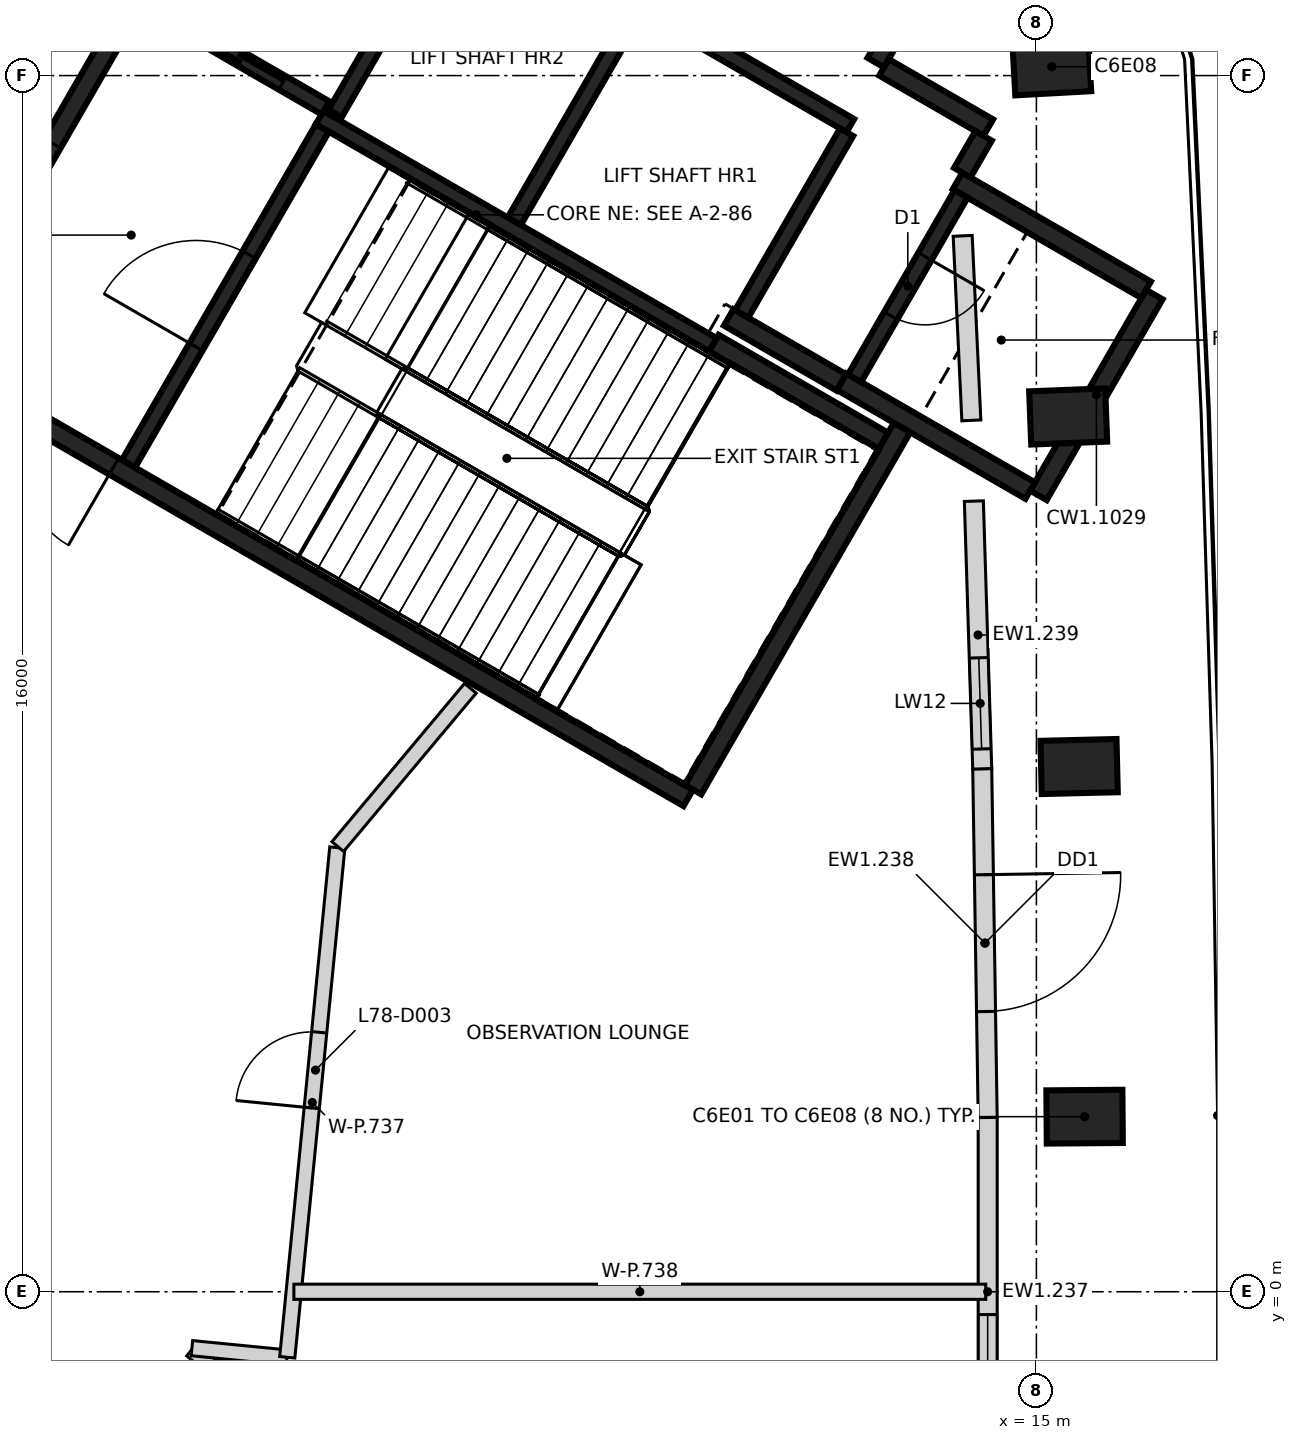
"""IFC4 building model, lengths in metres.
Left out: names, types, materials, properties, quantities, classifications, styles, units other than length and angle.
Written with IfcOpenShell. Run it as: python <this file> out.ifc"""

import sys

from ifc_helpers import new_model, si_unit, direction, frame, frame_2d, origin, origin_2d, place, context, subcontext, project, spatial, rectangle, extrude, element, fill, save


model = new_model("IFC4")
c1 = context("Model", 3, precision=1e-05, world=origin(), true_north=direction((0.0, 1.0)))
c2 = subcontext(c1, "Body", "Model", "MODEL_VIEW")
j1 = project(units=[si_unit("LENGTHUNIT", "METRE"), si_unit("PLANEANGLEUNIT", "RADIAN")], contexts=[c1])
p1 = place(None, origin())
s1 = spatial("IfcSite", under=j1, at=p1, CompositionType="ELEMENT")
p2 = place(p1, origin())
s2 = spatial("IfcBuilding", under=s1, at=p2, CompositionType="ELEMENT")
p3 = place(p2, frame((0.0, 0.0, 312.6)))
s3 = spatial("IfcBuildingStorey", under=s2, at=p3, CompositionType="ELEMENT", Elevation=312.6)
for number, where, z_axis, x_axis in (
    (1, (15.634, 2.303, -0.35), (0.0, 0.0, 1.0), (1.0, 0.008, 0.0)),
    (2, (15.562, 6.91, -0.35), (0.0, 0.0, 1.0), (1.0, 0.024, 0.0)),
    (3, (15.418, 11.515, -0.35), (0.0, 0.0, 1.0), (0.999, 0.039, 0.0)),
    (4, (15.202, 16.117, -0.35), (0.0, 0.0, 1.0), (0.998, 0.055, 0.0)),
):
    element("IfcColumn", number, at=place(p3, frame(where, z_axis=z_axis, x_axis=x_axis)), inside=s3, PredefinedType="COLUMN", context=c2, shape_type="SweptSolid", body=[
        extrude(rectangle(XDim=1.0, YDim=0.7, at=origin_2d()), origin(), (0.0, 0.0, 1.0), 8.1),
    ])
p4 = place(p3, frame((14.359, 2.295, 0.0), z_axis=(0.0, 0.0, 1.0), x_axis=(0.0, -1.0, 0.0)))
e5 = element("IfcWall", 5, at=p4, inside=s3, PredefinedType="SOLIDWALL", context=c2, shape_type="SweptSolid", body=[
    extrude(rectangle(XDim=4.589, YDim=0.25, at=frame_2d((2.295, 0.0))), origin(), (0.0, 0.0, 1.0), 7.75),
])
p5 = place(p4, frame((2.595, 0.0, 0.9)))
e6 = element("IfcOpeningElement", 6, at=p5, cuts=e5, PredefinedType="OPENING", context=c2, shape_type="SweptSolid", body=[
    extrude(rectangle(XDim=1.8, YDim=2.4, at=frame_2d((0.9, 1.2))), frame((0.0, 0.135, 0.0), z_axis=(0.0, -1.0, 0.0), x_axis=(1.0, 0.0, 0.0)), (0.0, 0.0, 1.0), 0.27),
])
p6 = place(p3, frame((14.287, 6.882, 0.0), z_axis=(0.0, 0.0, 1.0), x_axis=(0.015639712785, -0.999877692212, 0.0)))
e7 = element("IfcWall", 7, at=p6, inside=s3, PredefinedType="SOLIDWALL", context=c2, shape_type="SweptSolid", body=[
    extrude(rectangle(XDim=4.589, YDim=0.25, at=frame_2d((2.295, 0.0))), origin(), (0.0, 0.0, 1.0), 7.75),
])
p7 = place(p6, frame((1.395, 0.0, 0.0)))
e8 = element("IfcOpeningElement", 8, at=p7, cuts=e7, PredefinedType="OPENING", context=c2, shape_type="SweptSolid", body=[
    extrude(rectangle(XDim=1.8, YDim=2.4, at=frame_2d((0.9, 1.2))), frame((0.0, 0.135, 0.0), z_axis=(0.0, -1.0, 0.0), x_axis=(1.0, 0.0, 0.0)), (0.0, 0.0, 1.0), 0.27),
])
p8 = place(p3, frame((14.177, 10.401, 0.0), z_axis=(0.0, 0.0, 1.0), x_axis=(0.031249894825, -0.999511602771, 0.0)))
e9 = element("IfcWall", 9, at=p8, inside=s3, PredefinedType="SOLIDWALL", context=c2, shape_type="SweptSolid", body=[
    extrude(rectangle(XDim=3.523, YDim=0.25, at=frame_2d((1.762, 0.0))), origin(), (0.0, 0.0, 1.0), 7.75),
])
p9 = place(p8, frame((2.062, 0.0, 0.9)))
e10 = element("IfcOpeningElement", 10, at=p9, cuts=e9, PredefinedType="OPENING", context=c2, shape_type="SweptSolid", body=[
    extrude(rectangle(XDim=1.2, YDim=2.4, at=frame_2d((0.6, 1.2))), frame((0.0, 0.135, 0.0), z_axis=(0.0, -1.0, 0.0), x_axis=(1.0, 0.0, 0.0)), (0.0, 0.0, 1.0), 0.27),
])
p10 = place(p3, frame((14.03, 13.891, 0.0), z_axis=(0.0, 0.0, 1.0), x_axis=(0.046815754834, -0.998903541439, 0.0)))
e11 = element("IfcWall", 11, at=p10, inside=s3, PredefinedType="SOLIDWALL", context=c2, shape_type="SweptSolid", body=[
    extrude(rectangle(XDim=2.43, YDim=0.25, at=frame_2d((1.215, 0.0))), origin(), (0.0, 0.0, 1.0), 7.75),
])
p11 = place(p3, frame((10.42, 6.498, 0.0), z_axis=(0.0, 0.0, 1.0), x_axis=(-0.866021906294, 0.500006057782, 0.0)))
e12 = element("IfcWall", 12, at=p11, inside=s3, PredefinedType="SHEAR", context=c2, shape_type="SweptSolid", body=[
    extrude(rectangle(XDim=11.55, YDim=0.25, at=frame_2d((5.775, 0.0))), origin(), (0.0, 0.0, 1.0), 7.75),
])
p12 = place(p11, frame((10.025, 0.0, 0.0)))
e13 = element("IfcOpeningElement", 13, at=p12, cuts=e12, PredefinedType="OPENING", context=c2, shape_type="SweptSolid", body=[
    extrude(rectangle(XDim=1.2, YDim=2.1, at=frame_2d((0.6, 1.05))), frame((0.0, 0.135, 0.0), z_axis=(0.0, -1.0, 0.0), x_axis=(1.0, 0.0, 0.0)), (0.0, 0.0, 1.0), 0.27),
])
p13 = place(p11, frame((8.725, 0.0, 0.0)))
e14 = element("IfcOpeningElement", 14, at=p13, cuts=e12, PredefinedType="OPENING", context=c2, shape_type="SweptSolid", body=[
    extrude(rectangle(XDim=1.2, YDim=2.1, at=frame_2d((0.6, 1.05))), frame((0.0, 0.135, 0.0), z_axis=(0.0, -1.0, 0.0), x_axis=(1.0, 0.0, 0.0)), (0.0, 0.0, 1.0), 0.27),
])
p14 = place(p3, frame((0.48, 12.381, 0.0), z_axis=(0.0, 0.0, 1.0), x_axis=(0.49999885962, 0.866026062182, 0.0)))
e15 = element("IfcWall", 15, at=p14, inside=s3, PredefinedType="SHEAR", context=c2, shape_type="SweptSolid", body=[
    extrude(rectangle(XDim=5.225, YDim=0.25, at=frame_2d((2.612, 0.0))), origin(), (0.0, 0.0, 1.0), 7.75),
])
p15 = place(p14, frame((1.949, 0.0, 0.0)))
e16 = element("IfcOpeningElement", 16, at=p15, cuts=e15, PredefinedType="OPENING", context=c2, shape_type="SweptSolid", body=[
    extrude(rectangle(XDim=1.2, YDim=2.1, at=frame_2d((0.6, 1.05))), frame((0.0, 0.135, 0.0), z_axis=(0.0, -1.0, 0.0), x_axis=(1.0, 0.0, 0.0)), (0.0, 0.0, 1.0), 0.27),
])
p16 = place(p3, frame((13.238, 11.378, 0.0), z_axis=(0.0, 0.0, 1.0), x_axis=(-0.500008851346, -0.866020293397, 0.0)))
e17 = element("IfcWall", 17, at=p16, inside=s3, PredefinedType="SHEAR", context=c2, shape_type="SweptSolid", body=[
    extrude(rectangle(XDim=5.51, YDim=0.25, at=frame_2d((2.755, 0.0))), origin(), (0.0, 0.0, 1.0), 7.75),
])
p17 = place(p3, frame((16.552, 13.119, 0.0), z_axis=(0.0, 0.0, 1.0), x_axis=(-0.499978833458, -0.866037623948, 0.0)))
e18 = element("IfcWall", 18, at=p17, inside=s3, PredefinedType="SHEAR", context=c2, shape_type="SweptSolid", body=[
    extrude(rectangle(XDim=3.05, YDim=0.25, at=frame_2d((1.525, 0.0))), origin(), (0.0, 0.0, 1.0), 7.75),
])
p18 = place(p3, frame((14.918, 10.54, 0.0), z_axis=(0.0, 0.0, 1.0), x_axis=(-0.866063538972, 0.499933942099, 0.0)))
e19 = element("IfcWall", 19, at=p18, inside=s3, PredefinedType="SHEAR", context=c2, shape_type="SweptSolid", body=[
    extrude(rectangle(XDim=2.865, YDim=0.25, at=frame_2d((1.432, 0.0))), origin(), (0.0, 0.0, 1.0), 7.75),
])
p19 = place(p3, frame((13.963, 14.614, 0.0), z_axis=(0.0, 0.0, 1.0), x_axis=(0.866042235819, -0.499970844928, 0.0)))
e20 = element("IfcWall", 20, at=p19, inside=s3, PredefinedType="SHEAR", context=c2, shape_type="SweptSolid", body=[
    extrude(rectangle(XDim=2.865, YDim=0.25, at=frame_2d((1.432, 0.0))), origin(), (0.0, 0.0, 1.0), 7.75),
])
p20 = place(p3, frame((10.757, 12.481, 0.0), z_axis=(0.0, 0.0, 1.0), x_axis=(0.866022940537, -0.500004266446, 0.0)))
e21 = element("IfcWall", 21, at=p20, inside=s3, PredefinedType="SHEAR", context=c2, shape_type="SweptSolid", body=[
    extrude(rectangle(XDim=2.575, YDim=0.25, at=frame_2d((1.287, 0.0))), origin(), (0.0, 0.0, 1.0), 7.75),
])
p21 = place(p3, frame((13.819, 17.785, 0.0), z_axis=(0.0, 0.0, 1.0), x_axis=(-0.500039802285, -0.866002422705, 0.0)))
e22 = element("IfcWall", 22, at=p21, inside=s3, PredefinedType="SHEAR", context=c2, shape_type="SweptSolid", body=[
    extrude(rectangle(XDim=1.865, YDim=0.25, at=frame_2d((0.932, 0.0))), origin(), (0.0, 0.0, 1.0), 7.75),
])
p22 = place(p3, frame((12.433, 11.964, 0.0), z_axis=(0.0, 0.0, 1.0), x_axis=(-0.866038183914, 0.499977863513, 0.0)))
e23 = element("IfcWall", 23, at=p22, inside=s3, PredefinedType="SHEAR", context=c2, shape_type="SweptSolid", body=[
    extrude(rectangle(XDim=1.71, YDim=0.25, at=frame_2d((0.855, 0.0))), origin(), (0.0, 0.0, 1.0), 7.75),
])
p23 = place(p3, frame((12.995, 16.108, 0.0), z_axis=(0.0, 0.0, 1.0), x_axis=(0.866044474677, -0.49996696679, 0.0)))
e24 = element("IfcWall", 24, at=p23, inside=s3, PredefinedType="SHEAR", context=c2, shape_type="SweptSolid", body=[
    extrude(rectangle(XDim=1.584, YDim=0.25, at=frame_2d((0.792, 0.0))), origin(), (0.0, 0.0, 1.0), 7.75),
])
p24 = place(p3, frame((14.305, 15.207, 0.0), z_axis=(0.0, 0.0, 1.0), x_axis=(-0.499848422343, -0.866112899501, 0.0)))
e25 = element("IfcWall", 25, at=p24, inside=s3, PredefinedType="SHEAR", context=c2, shape_type="SweptSolid", body=[
    extrude(rectangle(XDim=0.559, YDim=0.25, at=frame_2d((0.28, 0.0))), origin(), (0.0, 0.0, 1.0), 7.75),
])
p25 = place(p3, frame((12.552, 15.342, 0.0), z_axis=(0.0, 0.0, 1.0), x_axis=(-0.866030299012, 0.499991521122, 0.0)))
e26 = element("IfcWall", 26, at=p25, inside=s3, PredefinedType="SHEAR", context=c2, shape_type="SweptSolid", body=[
    extrude(rectangle(XDim=6.1, YDim=0.2, at=frame_2d((3.05, 0.0))), origin(), (0.0, 0.0, 1.0), 7.75),
])
p26 = place(p3, frame((10.743, 12.46, 0.0), z_axis=(0.0, 0.0, 1.0), x_axis=(-0.866018848283, 0.500011354289, 0.0)))
e27 = element("IfcWall", 27, at=p26, inside=s3, PredefinedType="SHEAR", context=c2, shape_type="SweptSolid", body=[
    extrude(rectangle(XDim=5.974, YDim=0.2, at=frame_2d((2.987, 0.0))), origin(), (0.0, 0.0, 1.0), 7.75),
])
p27 = place(p3, frame((3.057, 10.895, 0.0), z_axis=(0.0, 0.0, 1.0), x_axis=(0.500027839223, 0.866009330205, 0.0)))
e28 = element("IfcWall", 28, at=p27, inside=s3, PredefinedType="SHEAR", context=c2, shape_type="SweptSolid", body=[
    extrude(rectangle(XDim=5.098, YDim=0.2, at=frame_2d((2.549, 0.0))), origin(), (0.0, 0.0, 1.0), 7.75),
])
p28 = place(p27, frame((1.774, 0.0, 0.0)))
e29 = element("IfcOpeningElement", 29, at=p28, cuts=e28, PredefinedType="OPENING", context=c2, shape_type="SweptSolid", body=[
    extrude(rectangle(XDim=1.4, YDim=2.1, at=frame_2d((0.7, 1.05))), frame((0.0, 0.11, 0.0), z_axis=(0.0, -1.0, 0.0), x_axis=(1.0, 0.0, 0.0)), (0.0, 0.0, 1.0), 0.22),
])
p29 = place(p3, frame((8.132, 14.084, 0.0), z_axis=(0.0, 0.0, 1.0), x_axis=(0.500030834389, 0.86600760081, 0.0)))
e30 = element("IfcWall", 30, at=p29, inside=s3, PredefinedType="SHEAR", context=c2, shape_type="SweptSolid", body=[
    extrude(rectangle(XDim=3.198, YDim=0.2, at=frame_2d((1.599, 0.0))), origin(), (0.0, 0.0, 1.0), 7.75),
])
p30 = place(p3, frame((14.008, 14.442, 0.0), z_axis=(0.0, 0.0, 1.0), x_axis=(-0.499986818241, -0.866033014143, 0.0)))
e31 = element("IfcWall", 31, at=p30, inside=s3, PredefinedType="SHEAR", context=c2, shape_type="SweptSolid", body=[
    extrude(rectangle(XDim=2.798, YDim=0.2, at=frame_2d((1.399, 0.0))), origin(), (0.0, 0.0, 1.0), 7.75),
])
p31 = place(p30, frame((0.949, 0.0, 0.0)))
e32 = element("IfcOpeningElement", 32, at=p31, cuts=e31, PredefinedType="OPENING", context=c2, shape_type="SweptSolid", body=[
    extrude(rectangle(XDim=0.9, YDim=2.1, at=frame_2d((0.45, 1.05))), frame((0.0, 0.11, 0.0), z_axis=(0.0, -1.0, 0.0), x_axis=(1.0, 0.0, 0.0)), (0.0, 0.0, 1.0), 0.22),
])
p32 = place(p3, frame((12.502, 15.255, 0.0), z_axis=(0.0, 0.0, 1.0), x_axis=(-0.499965018551, -0.866045599391, 0.0)))
e33 = element("IfcWall", 33, at=p32, inside=s3, PredefinedType="SHEAR", context=c2, shape_type="SweptSolid", body=[
    extrude(rectangle(XDim=2.759, YDim=0.2, at=frame_2d((1.379, 0.0))), origin(), (0.0, 0.0, 1.0), 7.75),
])
p33 = place(p3, frame((7.324, 18.187, 0.0), z_axis=(0.0, 0.0, 1.0), x_axis=(-0.499967891604, -0.866043940782, 0.0)))
e34 = element("IfcWall", 34, at=p33, inside=s3, PredefinedType="SHEAR", context=c2, shape_type="SweptSolid", body=[
    extrude(rectangle(XDim=3.1, YDim=0.2, at=frame_2d((1.55, 0.0))), origin(), (0.0, 0.0, 1.0), 7.75),
])
p34 = place(p3, frame((5.646, 15.576, 0.0), z_axis=(0.0, 0.0, 1.0), x_axis=(-0.866018407898, 0.500012117035, 0.0)))
e35 = element("IfcWall", 35, at=p34, inside=s3, PredefinedType="SHEAR", context=c2, shape_type="SweptSolid", body=[
    extrude(rectangle(XDim=2.651, YDim=0.2, at=frame_2d((1.325, 0.0))), origin(), (0.0, 0.0, 1.0), 7.75),
])
p35 = place(p34, frame((0.652, 0.0, 0.0)))
e36 = element("IfcOpeningElement", 36, at=p35, cuts=e35, PredefinedType="OPENING", context=c2, shape_type="SweptSolid", body=[
    extrude(rectangle(XDim=1.3, YDim=2.1, at=frame_2d((0.65, 1.05))), frame((0.0, 0.11, 0.0), z_axis=(0.0, -1.0, 0.0), x_axis=(1.0, 0.0, 0.0)), (0.0, 0.0, 1.0), 0.22),
])
p36 = place(p3, frame((-0.891, 13.057, 0.0), z_axis=(0.0, 0.0, 1.0), x_axis=(0.500039268703, 0.866002730801, 0.0)))
e37 = element("IfcWall", 37, at=p36, inside=s3, PredefinedType="PARTITIONING", context=c2, shape_type="SweptSolid", body=[
    extrude(rectangle(XDim=6.537, YDim=0.2, at=frame_2d((3.269, 0.0))), origin(), (0.0, 0.0, 1.0), 7.75),
])
p37 = place(p3, frame((3.884, -0.766, 0.0), z_axis=(0.0, 0.0, 1.0), x_axis=(0.782143113399, -0.623098828568, 0.0)))
e38 = element("IfcWall", 38, at=p37, inside=s3, PredefinedType="PARTITIONING", context=c2, shape_type="SweptSolid", body=[
    extrude(rectangle(XDim=6.496, YDim=0.2, at=frame_2d((3.248, 0.0))), origin(), (0.0, 0.0, 1.0), 7.75),
])
p38 = place(p37, frame((2.748, 0.0, 0.0)))
e39 = element("IfcOpeningElement", 39, at=p38, cuts=e38, PredefinedType="OPENING", context=c2, shape_type="SweptSolid", body=[
    extrude(rectangle(XDim=1.0, YDim=2.1, at=frame_2d((0.5, 1.05))), frame((0.0, 0.11, 0.0), z_axis=(0.0, -1.0, 0.0), x_axis=(1.0, 0.0, 0.0)), (0.0, 0.0, 1.0), 0.22),
])
p39 = place(p3, frame((3.89, -0.742, 0.0), z_axis=(0.0, 0.0, 1.0), x_axis=(0.9951992714, -0.097869352739, 0.0)))
e40 = element("IfcWall", 40, at=p39, inside=s3, PredefinedType="PARTITIONING", context=c2, shape_type="SweptSolid", body=[
    extrude(rectangle(XDim=1.257, YDim=0.2, at=frame_2d((0.629, 0.0))), origin(), (0.0, 0.0, 1.0), 7.75),
])
p40 = place(p3, frame((5.144, -0.862, 0.0), z_axis=(0.0, 0.0, 1.0), x_axis=(0.097767068111, 0.995209324913, 0.0)))
e41 = element("IfcWall", 41, at=p40, inside=s3, PredefinedType="PARTITIONING", context=c2, shape_type="SweptSolid", body=[
    extrude(rectangle(XDim=6.737, YDim=0.2, at=frame_2d((3.369, 0.0))), origin(), (0.0, 0.0, 1.0), 7.75),
])
p41 = place(p40, frame((3.296, 0.0, 0.0)))
e42 = element("IfcOpeningElement", 42, at=p41, cuts=e41, PredefinedType="OPENING", context=c2, shape_type="SweptSolid", body=[
    extrude(rectangle(XDim=1.0, YDim=2.1, at=frame_2d((0.5, 1.05))), frame((0.0, 0.11, 0.0), z_axis=(0.0, -1.0, 0.0), x_axis=(1.0, 0.0, 0.0)), (0.0, 0.0, 1.0), 0.22),
])
p42 = place(p3, frame((5.231, 0.0, 0.0), z_axis=(0.0, 0.0, 1.0), x_axis=(1.0, 0.0, 0.0)))
e43 = element("IfcWall", 43, at=p42, inside=s3, PredefinedType="PARTITIONING", context=c2, shape_type="SweptSolid", body=[
    extrude(rectangle(XDim=9.103, YDim=0.2, at=frame_2d((4.551, 0.0))), origin(), (0.0, 0.0, 1.0), 7.75),
])
p43 = place(p3, frame((5.809, 5.857, 0.0), z_axis=(0.0, 0.0, 1.0), x_axis=(0.642118517698, 0.766605380381, 0.0)))
e44 = element("IfcWall", 44, at=p43, inside=s3, PredefinedType="PARTITIONING", context=c2, shape_type="SweptSolid", body=[
    extrude(rectangle(XDim=2.716, YDim=0.2, at=frame_2d((1.358, 0.0))), origin(), (0.0, 0.0, 1.0), 7.75),
])
p44 = place(p5, origin())
e45 = element("IfcWindow", 45, at=p44, inside=s3, PartitioningType="SINGLE_PANEL", PredefinedType="WINDOW", context=c2, shape_type="SweptSolid", body=[
    extrude(rectangle(XDim=1.8, YDim=2.4, at=frame_2d((0.9, 1.2))), frame((0.0, 0.03, 0.0), z_axis=(0.0, -1.0, 0.0), x_axis=(1.0, 0.0, 0.0)), (0.0, 0.0, 1.0), 0.06),
])
fill(e6, e45)
p45 = place(p7, origin())
e46 = element("IfcDoor", 46, at=p45, inside=s3, OperationType="DOUBLE_DOOR_DOUBLE_SWING", PredefinedType="DOOR", context=c2, shape_type="SweptSolid", body=[
    extrude(rectangle(XDim=1.8, YDim=2.4, at=frame_2d((0.9, 1.2))), frame((0.0, 0.025, 0.0), z_axis=(0.0, -1.0, 0.0), x_axis=(1.0, 0.0, 0.0)), (0.0, 0.0, 1.0), 0.05),
])
fill(e8, e46)
p46 = place(p9, origin())
e47 = element("IfcWindow", 47, at=p46, inside=s3, PartitioningType="SINGLE_PANEL", PredefinedType="WINDOW", context=c2, shape_type="SweptSolid", body=[
    extrude(rectangle(XDim=1.2, YDim=2.4, at=frame_2d((0.6, 1.2))), frame((0.0, 0.03, 0.0), z_axis=(0.0, -1.0, 0.0), x_axis=(1.0, 0.0, 0.0)), (0.0, 0.0, 1.0), 0.06),
])
fill(e10, e47)
p47 = place(p35, origin())
e48 = element("IfcDoor", 48, at=p47, inside=s3, OperationType="SLIDING_TO_RIGHT", PredefinedType="DOOR", context=c2, shape_type="SweptSolid", body=[
    extrude(rectangle(XDim=1.3, YDim=2.1, at=frame_2d((0.65, 1.05))), frame((0.0, 0.025, 0.0), z_axis=(0.0, -1.0, 0.0), x_axis=(1.0, 0.0, 0.0)), (0.0, 0.0, 1.0), 0.05),
])
fill(e36, e48)
p48 = place(p13, origin())
e49 = element("IfcDoor", 49, at=p48, inside=s3, OperationType="SINGLE_SWING_RIGHT", PredefinedType="DOOR", context=c2, shape_type="SweptSolid", body=[
    extrude(rectangle(XDim=1.2, YDim=2.1, at=frame_2d((0.6, 1.05))), frame((0.0, 0.025, 0.0), z_axis=(0.0, -1.0, 0.0), x_axis=(1.0, 0.0, 0.0)), (0.0, 0.0, 1.0), 0.05),
])
fill(e14, e49)
p49 = place(p15, origin())
e50 = element("IfcDoor", 50, at=p49, inside=s3, OperationType="SINGLE_SWING_LEFT", PredefinedType="DOOR", context=c2, shape_type="SweptSolid", body=[
    extrude(rectangle(XDim=1.2, YDim=2.1, at=frame_2d((0.6, 1.05))), frame((0.0, 0.025, 0.0), z_axis=(0.0, -1.0, 0.0), x_axis=(1.0, 0.0, 0.0)), (0.0, 0.0, 1.0), 0.05),
])
fill(e16, e50)
p50 = place(p28, origin())
e51 = element("IfcDoor", 51, at=p50, inside=s3, OperationType="SINGLE_SWING_LEFT", PredefinedType="DOOR", context=c2, shape_type="SweptSolid", body=[
    extrude(rectangle(XDim=1.4, YDim=2.1, at=frame_2d((0.7, 1.05))), frame((0.0, 0.025, 0.0), z_axis=(0.0, -1.0, 0.0), x_axis=(1.0, 0.0, 0.0)), (0.0, 0.0, 1.0), 0.05),
])
fill(e29, e51)
p51 = place(p31, origin())
e52 = element("IfcDoor", 52, at=p51, inside=s3, OperationType="SINGLE_SWING_RIGHT", PredefinedType="DOOR", context=c2, shape_type="SweptSolid", body=[
    extrude(rectangle(XDim=0.9, YDim=2.1, at=frame_2d((0.45, 1.05))), frame((0.0, 0.025, 0.0), z_axis=(0.0, -1.0, 0.0), x_axis=(1.0, 0.0, 0.0)), (0.0, 0.0, 1.0), 0.05),
])
fill(e32, e52)
p52 = place(p41, frame((1.0, 0.0, 0.0), z_axis=(0.0, 0.0, 1.0), x_axis=(-1.0, 0.0, 0.0)))
e53 = element("IfcDoor", 53, at=p52, inside=s3, OperationType="SINGLE_SWING_LEFT", PredefinedType="DOOR", context=c2, shape_type="SweptSolid", body=[
    extrude(rectangle(XDim=1.0, YDim=2.1, at=frame_2d((0.5, 1.05))), frame((0.0, 0.025, 0.0), z_axis=(0.0, -1.0, 0.0), x_axis=(1.0, 0.0, 0.0)), (0.0, 0.0, 1.0), 0.05),
])
fill(e42, e53)
save(model, sys.argv[1])
